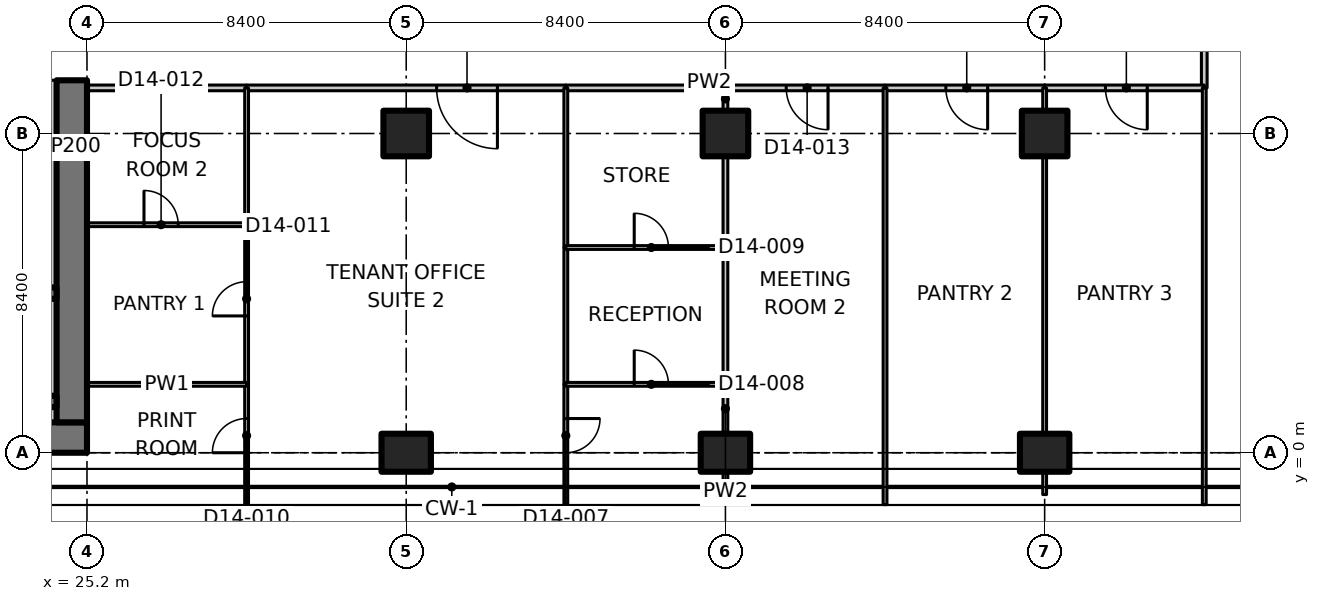
"""IFC4 building model, lengths in metres.
Left out: names, types, materials, properties, quantities, classifications, styles, units other than length and angle.
Written with IfcOpenShell. Run it as: python <this file> out.ifc"""

import sys

from ifc_helpers import new_model, si_unit, direction, frame, frame_2d, origin, origin_2d, place, context, subcontext, project, spatial, polyline, rectangle, outline, extrude, element, fill, save


model = new_model("IFC4")
c1 = context("Model", 3, precision=1e-05, world=origin(), true_north=direction((0.0, 1.0)))
c2 = subcontext(c1, "Body", "Model", "MODEL_VIEW")
j1 = project(units=[si_unit("LENGTHUNIT", "METRE"), si_unit("PLANEANGLEUNIT", "RADIAN")], contexts=[c1])
p1 = place(None, origin())
s1 = spatial("IfcSite", under=j1, at=p1, CompositionType="ELEMENT")
p2 = place(p1, origin())
s2 = spatial("IfcBuilding", under=s1, at=p2, CompositionType="ELEMENT")
p3 = place(p2, frame((0.0, 0.0, 102.5)))
s3 = spatial("IfcBuildingStorey", under=s2, at=p3, CompositionType="ELEMENT", Elevation=102.5)
p4 = place(p3, frame((33.6, 0.0, 0.0), z_axis=(0.0, 0.0, 1.0), x_axis=(0.0, 1.0, 0.0)))
e1 = element("IfcColumn", 1, at=p4, inside=s3, PredefinedType="COLUMN", context=c2, shape_type="SweptSolid", body=[
    extrude(rectangle(XDim=1.0, YDim=1.3, at=origin_2d()), origin(), (0.0, 0.0, 1.0), 3.35),
])
p5 = place(p3, frame((33.6, 8.4, 0.0), z_axis=(0.0, 0.0, 1.0), x_axis=(1.0, 0.0, 0.0)))
e2 = element("IfcColumn", 2, at=p5, inside=s3, PredefinedType="COLUMN", context=c2, shape_type="SweptSolid", body=[
    extrude(rectangle(XDim=1.2, YDim=1.2, at=origin_2d()), origin(), (0.0, 0.0, 1.0), 3.35),
])
p6 = place(p3, frame((42.0, 0.0, 0.0), z_axis=(0.0, 0.0, 1.0), x_axis=(0.0, 1.0, 0.0)))
e3 = element("IfcColumn", 3, at=p6, inside=s3, PredefinedType="COLUMN", context=c2, shape_type="SweptSolid", body=[
    extrude(rectangle(XDim=1.0, YDim=1.3, at=origin_2d()), origin(), (0.0, 0.0, 1.0), 3.35),
])
p7 = place(p3, frame((42.0, 8.4, 0.0), z_axis=(0.0, 0.0, 1.0), x_axis=(1.0, 0.0, 0.0)))
e4 = element("IfcColumn", 4, at=p7, inside=s3, PredefinedType="COLUMN", context=c2, shape_type="SweptSolid", body=[
    extrude(rectangle(XDim=1.2, YDim=1.2, at=origin_2d()), origin(), (0.0, 0.0, 1.0), 3.35),
])
p8 = place(p3, frame((50.4, 0.0, 0.0), z_axis=(0.0, 0.0, 1.0), x_axis=(0.0, 1.0, 0.0)))
e5 = element("IfcColumn", 5, at=p8, inside=s3, PredefinedType="COLUMN", context=c2, shape_type="SweptSolid", body=[
    extrude(rectangle(XDim=1.0, YDim=1.3, at=origin_2d()), origin(), (0.0, 0.0, 1.0), 3.35),
])
p9 = place(p3, frame((50.4, 8.4, 0.0), z_axis=(0.0, 0.0, 1.0), x_axis=(1.0, 0.0, 0.0)))
e6 = element("IfcColumn", 6, at=p9, inside=s3, PredefinedType="COLUMN", context=c2, shape_type="SweptSolid", body=[
    extrude(rectangle(XDim=1.2, YDim=1.2, at=origin_2d()), origin(), (0.0, 0.0, 1.0), 3.35),
])
p10 = place(p3, frame((7.136, 0.4, 0.0), z_axis=(0.0, 0.0, 1.0), x_axis=(1.0, 0.0, 0.0)))
e7 = element("IfcWall", 7, at=p10, inside=s3, PredefinedType="SHEAR", context=c2, shape_type="SweptSolid", body=[
    extrude(rectangle(XDim=18.063, YDim=0.8, at=frame_2d((9.032, 0.0))), origin(), (0.0, 0.0, 1.0), 3.35),
])
p11 = place(p3, frame((24.8, 0.8, 0.0), z_axis=(0.0, 0.0, 1.0), x_axis=(0.0, 1.0, 0.0)))
e8 = element("IfcWall", 8, at=p11, inside=s3, PredefinedType="SHEAR", context=c2, shape_type="SweptSolid", body=[
    extrude(rectangle(XDim=9.0, YDim=0.8, at=frame_2d((4.5, 0.0))), origin(), (0.0, 0.0, 1.0), 3.35),
])
p12 = place(p3, frame((15.8, 1.35, 0.0), z_axis=(0.0, 0.0, 1.0), x_axis=(1.0, 0.0, 0.0)))
e9 = element("IfcWall", 9, at=p12, inside=s3, PredefinedType="SHEAR", context=c2, shape_type="SweptSolid", body=[
    extrude(rectangle(XDim=8.6, YDim=0.3, at=frame_2d((4.3, 0.0))), origin(), (0.0, 0.0, 1.0), 3.35),
])
p13 = place(p3, frame((15.8, 4.2, 0.0), z_axis=(0.0, 0.0, 1.0), x_axis=(1.0, 0.0, 0.0)))
e10 = element("IfcWall", 10, at=p13, inside=s3, PredefinedType="SHEAR", context=c2, shape_type="SweptSolid", body=[
    extrude(rectangle(XDim=8.6, YDim=0.3, at=frame_2d((4.3, 0.0))), origin(), (0.0, 0.0, 1.0), 3.35),
])
p14 = place(p13, frame((0.4, 0.0, 0.0)))
e11 = element("IfcOpeningElement", 11, at=p14, cuts=e10, PredefinedType="OPENING", context=c2, shape_type="SweptSolid", body=[
    extrude(rectangle(XDim=1.0, YDim=2.1, at=frame_2d((0.5, 1.05))), frame((0.0, 0.16, 0.0), z_axis=(0.0, -1.0, 0.0), x_axis=(1.0, 0.0, 0.0)), (0.0, 0.0, 1.0), 0.32),
])
p15 = place(p3, frame((13.35, 1.0, 0.0), z_axis=(0.0, 0.0, 1.0), x_axis=(1.0, 0.0, 0.0)))
e12 = element("IfcWall", 12, at=p15, inside=s3, PredefinedType="PARTITIONING", context=c2, shape_type="SweptSolid", body=[
    extrude(rectangle(XDim=11.05, YDim=0.4, at=frame_2d((5.525, 0.0))), origin(), (0.0, 0.0, 1.0), 3.35),
])
p16 = place(p3, frame((24.2, 1.5, 0.0), z_axis=(0.0, 0.0, 1.0), x_axis=(0.0, 1.0, 0.0)))
e13 = element("IfcWall", 13, at=p16, inside=s3, PredefinedType="PARTITIONING", context=c2, shape_type="SweptSolid", body=[
    extrude(rectangle(XDim=2.55, YDim=0.4, at=frame_2d((1.275, 0.0))), origin(), (0.0, 0.0, 1.0), 3.35),
])
p17 = place(p3, frame((24.2, 4.35, 0.0), z_axis=(0.0, 0.0, 1.0), x_axis=(0.0, 1.0, 0.0)))
e14 = element("IfcWall", 14, at=p17, inside=s3, PredefinedType="PARTITIONING", context=c2, shape_type="SweptSolid", body=[
    extrude(rectangle(XDim=5.45, YDim=0.4, at=frame_2d((2.725, 0.0))), origin(), (0.0, 0.0, 1.0), 3.35),
])
p18 = place(p3, frame((29.4, 9.6, 0.0), z_axis=(0.0, 0.0, 1.0), x_axis=(-1.0, 0.0, 0.0)))
e15 = element("IfcWall", 15, at=p18, inside=s3, PredefinedType="PARTITIONING", context=c2, shape_type="SweptSolid", body=[
    extrude(rectangle(XDim=4.2, YDim=0.15, at=frame_2d((2.1, 0.0))), origin(), (0.0, 0.0, 1.0), 3.33),
])
p19 = place(p3, frame((54.6, 13.0, 0.0), z_axis=(0.0, 0.0, 1.0), x_axis=(0.0, -1.0, 0.0)))
e16 = element("IfcWall", 16, at=p19, inside=s3, PredefinedType="PARTITIONING", context=c2, shape_type="SweptSolid", body=[
    extrude(rectangle(XDim=3.4, YDim=0.15, at=frame_2d((1.7, 0.0))), origin(), (0.0, 0.0, 1.0), 3.33),
])
p20 = place(p3, frame((37.8, 9.6, 0.0), z_axis=(0.0, 0.0, 1.0), x_axis=(-1.0, 0.0, 0.0)))
e17 = element("IfcWall", 17, at=p20, inside=s3, PredefinedType="PARTITIONING", context=c2, shape_type="SweptSolid", body=[
    extrude(rectangle(XDim=8.4, YDim=0.15, at=frame_2d((4.2, 0.0))), origin(), (0.0, 0.0, 1.0), 3.33),
])
p21 = place(p20, frame((1.8, 0.0, 0.0)))
e18 = element("IfcOpeningElement", 18, at=p21, cuts=e17, PredefinedType="OPENING", context=c2, shape_type="SweptSolid", body=[
    extrude(rectangle(XDim=1.6, YDim=2.1, at=frame_2d((0.8, 1.05))), frame((0.0, 0.085, 0.0), z_axis=(0.0, -1.0, 0.0), x_axis=(1.0, 0.0, 0.0)), (0.0, 0.0, 1.0), 0.17),
])
p22 = place(p3, frame((42.0, 9.6, 0.0), z_axis=(0.0, 0.0, 1.0), x_axis=(-1.0, 0.0, 0.0)))
e19 = element("IfcWall", 19, at=p22, inside=s3, PredefinedType="PARTITIONING", context=c2, shape_type="SweptSolid", body=[
    extrude(rectangle(XDim=4.2, YDim=0.15, at=frame_2d((2.1, 0.0))), origin(), (0.0, 0.0, 1.0), 3.33),
])
p23 = place(p3, frame((46.2, 9.6, 0.0), z_axis=(0.0, 0.0, 1.0), x_axis=(-1.0, 0.0, 0.0)))
e20 = element("IfcWall", 20, at=p23, inside=s3, PredefinedType="PARTITIONING", context=c2, shape_type="SweptSolid", body=[
    extrude(rectangle(XDim=4.2, YDim=0.15, at=frame_2d((2.1, 0.0))), origin(), (0.0, 0.0, 1.0), 3.33),
])
p24 = place(p23, frame((1.5, 0.0, 0.0)))
e21 = element("IfcOpeningElement", 21, at=p24, cuts=e20, PredefinedType="OPENING", context=c2, shape_type="SweptSolid", body=[
    extrude(rectangle(XDim=1.1, YDim=2.1, at=frame_2d((0.55, 1.05))), frame((0.0, 0.085, 0.0), z_axis=(0.0, -1.0, 0.0), x_axis=(1.0, 0.0, 0.0)), (0.0, 0.0, 1.0), 0.17),
])
p25 = place(p3, frame((50.4, 9.6, 0.0), z_axis=(0.0, 0.0, 1.0), x_axis=(-1.0, 0.0, 0.0)))
e22 = element("IfcWall", 22, at=p25, inside=s3, PredefinedType="PARTITIONING", context=c2, shape_type="SweptSolid", body=[
    extrude(rectangle(XDim=4.2, YDim=0.15, at=frame_2d((2.1, 0.0))), origin(), (0.0, 0.0, 1.0), 3.33),
])
p26 = place(p25, frame((1.5, 0.0, 0.0)))
e23 = element("IfcOpeningElement", 23, at=p26, cuts=e22, PredefinedType="OPENING", context=c2, shape_type="SweptSolid", body=[
    extrude(rectangle(XDim=1.1, YDim=2.1, at=frame_2d((0.55, 1.05))), frame((0.0, 0.085, 0.0), z_axis=(0.0, -1.0, 0.0), x_axis=(1.0, 0.0, 0.0)), (0.0, 0.0, 1.0), 0.17),
])
p27 = place(p3, frame((54.6, 9.6, 0.0), z_axis=(0.0, 0.0, 1.0), x_axis=(-1.0, 0.0, 0.0)))
e24 = element("IfcWall", 24, at=p27, inside=s3, PredefinedType="PARTITIONING", context=c2, shape_type="SweptSolid", body=[
    extrude(rectangle(XDim=4.2, YDim=0.15, at=frame_2d((2.1, 0.0))), origin(), (0.0, 0.0, 1.0), 3.33),
])
p28 = place(p27, frame((1.5, 0.0, 0.0)))
e25 = element("IfcOpeningElement", 25, at=p28, cuts=e24, PredefinedType="OPENING", context=c2, shape_type="SweptSolid", body=[
    extrude(rectangle(XDim=1.1, YDim=2.1, at=frame_2d((0.55, 1.05))), frame((0.0, 0.085, 0.0), z_axis=(0.0, -1.0, 0.0), x_axis=(1.0, 0.0, 0.0)), (0.0, 0.0, 1.0), 0.17),
])
p29 = place(p3, frame((54.6, -1.365, 0.0), z_axis=(0.0, 0.0, 1.0), x_axis=(0.0, 1.0, 0.0)))
e26 = element("IfcWall", 26, at=p29, inside=s3, PredefinedType="PARTITIONING", context=c2, shape_type="SweptSolid", body=[
    extrude(outline(polyline([(0.0, 0.0), (10.965, 0.0), (10.965, 3.33), (1.815, 3.33), (1.813, 2.98), (0.917, 2.98), (0.915, 3.33), (0.265, 3.33), (0.0, 3.33), (0.0, 0.0)])), frame((0.0, 0.05, 0.0), z_axis=(0.0, -1.0, 0.0), x_axis=(1.0, 0.0, 0.0)), (0.0, 0.0, 1.0), 0.1),
])
p30 = place(p3, frame((37.8, 1.8, 0.0), z_axis=(0.0, 0.0, 1.0), x_axis=(0.0, -1.0, 0.0)))
e27 = element("IfcWall", 27, at=p30, inside=s3, PredefinedType="PARTITIONING", context=c2, shape_type="SweptSolid", body=[
    extrude(rectangle(XDim=3.165, YDim=0.1, at=frame_2d((1.583, 0.0))), origin(), (0.0, 0.0, 1.0), 2.98),
])
p31 = place(p30, frame((0.9, 0.0, 0.0)))
e28 = element("IfcOpeningElement", 28, at=p31, cuts=e27, PredefinedType="OPENING", context=c2, shape_type="SweptSolid", body=[
    extrude(rectangle(XDim=0.9, YDim=2.1, at=frame_2d((0.45, 1.05))), frame((0.0, 0.06, 0.0), z_axis=(0.0, -1.0, 0.0), x_axis=(1.0, 0.0, 0.0)), (0.0, 0.0, 1.0), 0.12),
])
p32 = place(p3, frame((37.8, 5.4, 0.0), z_axis=(0.0, 0.0, 1.0), x_axis=(0.0, -1.0, 0.0)))
e29 = element("IfcWall", 29, at=p32, inside=s3, PredefinedType="PARTITIONING", context=c2, shape_type="SweptSolid", body=[
    extrude(rectangle(XDim=3.6, YDim=0.1, at=frame_2d((1.8, 0.0))), origin(), (0.0, 0.0, 1.0), 3.33),
])
p33 = place(p3, frame((37.8, 9.6, 0.0), z_axis=(0.0, 0.0, 1.0), x_axis=(0.0, -1.0, 0.0)))
e30 = element("IfcWall", 30, at=p33, inside=s3, PredefinedType="PARTITIONING", context=c2, shape_type="SweptSolid", body=[
    extrude(rectangle(XDim=4.2, YDim=0.1, at=frame_2d((2.1, 0.0))), origin(), (0.0, 0.0, 1.0), 3.33),
])
p34 = place(p3, frame((29.4, -1.365, 0.0), z_axis=(0.0, 0.0, 1.0), x_axis=(0.0, 1.0, 0.0)))
e31 = element("IfcWall", 31, at=p34, inside=s3, PredefinedType="PARTITIONING", context=c2, shape_type="SweptSolid", body=[
    extrude(rectangle(XDim=3.165, YDim=0.1, at=frame_2d((1.583, 0.0))), origin(), (0.0, 0.0, 1.0), 2.98),
])
p35 = place(p34, frame((1.365, 0.0, 0.0)))
e32 = element("IfcOpeningElement", 32, at=p35, cuts=e31, PredefinedType="OPENING", context=c2, shape_type="SweptSolid", body=[
    extrude(rectangle(XDim=0.9, YDim=2.1, at=frame_2d((0.45, 1.05))), frame((0.0, 0.06, 0.0), z_axis=(0.0, -1.0, 0.0), x_axis=(1.0, 0.0, 0.0)), (0.0, 0.0, 1.0), 0.12),
])
p36 = place(p3, frame((29.4, 1.8, 0.0), z_axis=(0.0, 0.0, 1.0), x_axis=(0.0, 1.0, 0.0)))
e33 = element("IfcWall", 33, at=p36, inside=s3, PredefinedType="PARTITIONING", context=c2, shape_type="SweptSolid", body=[
    extrude(rectangle(XDim=4.2, YDim=0.1, at=frame_2d((2.1, 0.0))), origin(), (0.0, 0.0, 1.0), 3.33),
])
p37 = place(p36, frame((1.8, 0.0, 0.0)))
e34 = element("IfcOpeningElement", 34, at=p37, cuts=e33, PredefinedType="OPENING", context=c2, shape_type="SweptSolid", body=[
    extrude(rectangle(XDim=0.9, YDim=2.1, at=frame_2d((0.45, 1.05))), frame((0.0, 0.06, 0.0), z_axis=(0.0, -1.0, 0.0), x_axis=(1.0, 0.0, 0.0)), (0.0, 0.0, 1.0), 0.12),
])
p38 = place(p3, frame((29.4, 6.0, 0.0), z_axis=(0.0, 0.0, 1.0), x_axis=(0.0, 1.0, 0.0)))
e35 = element("IfcWall", 35, at=p38, inside=s3, PredefinedType="PARTITIONING", context=c2, shape_type="SweptSolid", body=[
    extrude(rectangle(XDim=3.6, YDim=0.1, at=frame_2d((1.8, 0.0))), origin(), (0.0, 0.0, 1.0), 3.33),
])
p39 = place(p3, frame((37.8, 1.8, 0.0), z_axis=(0.0, 0.0, 1.0), x_axis=(1.0, 0.0, 0.0)))
e36 = element("IfcWall", 36, at=p39, inside=s3, PredefinedType="PARTITIONING", context=c2, shape_type="SweptSolid", body=[
    extrude(rectangle(XDim=4.2, YDim=0.1, at=frame_2d((2.1, 0.0))), origin(), (0.0, 0.0, 1.0), 3.33),
])
p40 = place(p39, frame((1.8, 0.0, 0.0)))
e37 = element("IfcOpeningElement", 37, at=p40, cuts=e36, PredefinedType="OPENING", context=c2, shape_type="SweptSolid", body=[
    extrude(rectangle(XDim=0.9, YDim=2.1, at=frame_2d((0.45, 1.05))), frame((0.0, 0.06, 0.0), z_axis=(0.0, -1.0, 0.0), x_axis=(1.0, 0.0, 0.0)), (0.0, 0.0, 1.0), 0.12),
])
p41 = place(p3, frame((42.0, 1.8, 0.0), z_axis=(0.0, 0.0, 1.0), x_axis=(0.0, -1.0, 0.0)))
e38 = element("IfcWall", 38, at=p41, inside=s3, PredefinedType="PARTITIONING", context=c2, shape_type="SweptSolid", body=[
    extrude(rectangle(XDim=1.28, YDim=0.125, at=frame_2d((0.64, 0.0))), origin(), (0.0, 0.0, 1.0), 3.33),
])
p42 = place(p3, frame((42.0, -0.52, 0.0), z_axis=(0.0, 0.0, 1.0), x_axis=(0.0, -1.0, 0.0)))
e39 = element("IfcWall", 39, at=p42, inside=s3, PredefinedType="PARTITIONING", context=c2, shape_type="SweptSolid", body=[
    extrude(rectangle(XDim=0.58, YDim=0.125, at=frame_2d((0.29, 0.0))), origin(), (0.0, 0.0, 1.0), 3.33),
])
p43 = place(p3, frame((37.8, 5.4, 0.0), z_axis=(0.0, 0.0, 1.0), x_axis=(1.0, 0.0, 0.0)))
e40 = element("IfcWall", 40, at=p43, inside=s3, PredefinedType="PARTITIONING", context=c2, shape_type="SweptSolid", body=[
    extrude(rectangle(XDim=4.2, YDim=0.1, at=frame_2d((2.1, 0.0))), origin(), (0.0, 0.0, 1.0), 3.33),
])
p44 = place(p43, frame((1.8, 0.0, 0.0)))
e41 = element("IfcOpeningElement", 41, at=p44, cuts=e40, PredefinedType="OPENING", context=c2, shape_type="SweptSolid", body=[
    extrude(rectangle(XDim=0.9, YDim=2.1, at=frame_2d((0.45, 1.05))), frame((0.0, 0.06, 0.0), z_axis=(0.0, -1.0, 0.0), x_axis=(1.0, 0.0, 0.0)), (0.0, 0.0, 1.0), 0.12),
])
p45 = place(p3, frame((42.0, 5.4, 0.0), z_axis=(0.0, 0.0, 1.0), x_axis=(0.0, -1.0, 0.0)))
e42 = element("IfcWall", 42, at=p45, inside=s3, PredefinedType="PARTITIONING", context=c2, shape_type="SweptSolid", body=[
    extrude(rectangle(XDim=3.6, YDim=0.125, at=frame_2d((1.8, 0.0))), origin(), (0.0, 0.0, 1.0), 3.33),
])
p46 = place(p3, frame((42.0, 9.6, 0.0), z_axis=(0.0, 0.0, 1.0), x_axis=(0.0, -1.0, 0.0)))
e43 = element("IfcWall", 43, at=p46, inside=s3, PredefinedType="PARTITIONING", context=c2, shape_type="SweptSolid", body=[
    extrude(rectangle(XDim=0.58, YDim=0.125, at=frame_2d((0.29, 0.0))), origin(), (0.0, 0.0, 1.0), 3.33),
])
p47 = place(p3, frame((42.0, 7.78, 0.0), z_axis=(0.0, 0.0, 1.0), x_axis=(0.0, -1.0, 0.0)))
e44 = element("IfcWall", 44, at=p47, inside=s3, PredefinedType="PARTITIONING", context=c2, shape_type="SweptSolid", body=[
    extrude(rectangle(XDim=2.38, YDim=0.125, at=frame_2d((1.19, 0.0))), origin(), (0.0, 0.0, 1.0), 3.33),
])
p48 = place(p3, frame((25.2, 1.8, 0.0), z_axis=(0.0, 0.0, 1.0), x_axis=(1.0, 0.0, 0.0)))
e45 = element("IfcWall", 45, at=p48, inside=s3, PredefinedType="PARTITIONING", context=c2, shape_type="SweptSolid", body=[
    extrude(rectangle(XDim=4.2, YDim=0.1, at=frame_2d((2.1, 0.0))), origin(), (0.0, 0.0, 1.0), 3.33),
])
p49 = place(p3, frame((25.2, 6.0, 0.0), z_axis=(0.0, 0.0, 1.0), x_axis=(1.0, 0.0, 0.0)))
e46 = element("IfcWall", 46, at=p49, inside=s3, PredefinedType="PARTITIONING", context=c2, shape_type="SweptSolid", body=[
    extrude(rectangle(XDim=4.2, YDim=0.1, at=frame_2d((2.1, 0.0))), origin(), (0.0, 0.0, 1.0), 3.33),
])
p50 = place(p49, frame((1.5, 0.0, 0.0)))
e47 = element("IfcOpeningElement", 47, at=p50, cuts=e46, PredefinedType="OPENING", context=c2, shape_type="SweptSolid", body=[
    extrude(rectangle(XDim=0.9, YDim=2.1, at=frame_2d((0.45, 1.05))), frame((0.0, 0.06, 0.0), z_axis=(0.0, -1.0, 0.0), x_axis=(1.0, 0.0, 0.0)), (0.0, 0.0, 1.0), 0.12),
])
p51 = place(p3, frame((46.2, 9.6, 0.0), z_axis=(0.0, 0.0, 1.0), x_axis=(0.0, -1.0, 0.0)))
e48 = element("IfcWall", 48, at=p51, inside=s3, PredefinedType="PARTITIONING", context=c2, shape_type="SweptSolid", body=[
    extrude(outline(polyline([(0.0, 0.0), (10.965, 0.0), (10.965, 3.33), (10.7, 3.33), (10.05, 3.33), (10.048, 2.98), (9.152, 2.98), (9.15, 3.33), (0.0, 3.33), (0.0, 0.0)])), frame((0.0, 0.05, 0.0), z_axis=(0.0, -1.0, 0.0), x_axis=(1.0, 0.0, 0.0)), (0.0, 0.0, 1.0), 0.1),
])
p52 = place(p3, frame((50.4, 9.6, 0.0), z_axis=(0.0, 0.0, 1.0), x_axis=(0.0, -1.0, 0.0)))
e49 = element("IfcWall", 49, at=p52, inside=s3, PredefinedType="PARTITIONING", context=c2, shape_type="SweptSolid", body=[
    extrude(rectangle(XDim=0.58, YDim=0.1, at=frame_2d((0.29, 0.0))), origin(), (0.0, 0.0, 1.0), 3.33),
])
p53 = place(p3, frame((50.4, 7.78, 0.0), z_axis=(0.0, 0.0, 1.0), x_axis=(0.0, -1.0, 0.0)))
e50 = element("IfcWall", 50, at=p53, inside=s3, PredefinedType="PARTITIONING", context=c2, shape_type="SweptSolid", body=[
    extrude(rectangle(XDim=7.26, YDim=0.1, at=frame_2d((3.63, 0.0))), origin(), (0.0, 0.0, 1.0), 3.33),
])
p54 = place(p3, frame((50.4, -0.52, 0.0), z_axis=(0.0, 0.0, 1.0), x_axis=(0.0, -1.0, 0.0)))
e51 = element("IfcWall", 51, at=p54, inside=s3, PredefinedType="PARTITIONING", context=c2, shape_type="SweptSolid", body=[
    extrude(rectangle(XDim=0.58, YDim=0.1, at=frame_2d((0.29, 0.0))), origin(), (0.0, 0.0, 1.0), 3.33),
])
p55 = place(p21, origin())
e52 = element("IfcDoor", 52, at=p55, inside=s3, OperationType="DOUBLE_DOOR_SINGLE_SWING", PredefinedType="DOOR", context=c2, shape_type="SweptSolid", body=[
    extrude(rectangle(XDim=1.6, YDim=2.1, at=frame_2d((0.8, 1.05))), frame((0.0, 0.025, 0.0), z_axis=(0.0, -1.0, 0.0), x_axis=(1.0, 0.0, 0.0)), (0.0, 0.0, 1.0), 0.05),
])
fill(e18, e52)
p56 = place(p31, origin())
e53 = element("IfcDoor", 53, at=p56, inside=s3, OperationType="SINGLE_SWING_LEFT", PredefinedType="DOOR", context=c2, shape_type="SweptSolid", body=[
    extrude(rectangle(XDim=0.9, YDim=2.1, at=frame_2d((0.45, 1.05))), frame((0.0, 0.025, 0.0), z_axis=(0.0, -1.0, 0.0), x_axis=(1.0, 0.0, 0.0)), (0.0, 0.0, 1.0), 0.05),
])
fill(e28, e53)
p57 = place(p40, origin())
e54 = element("IfcDoor", 54, at=p57, inside=s3, OperationType="SINGLE_SWING_LEFT", PredefinedType="DOOR", context=c2, shape_type="SweptSolid", body=[
    extrude(rectangle(XDim=0.9, YDim=2.1, at=frame_2d((0.45, 1.05))), frame((0.0, 0.025, 0.0), z_axis=(0.0, -1.0, 0.0), x_axis=(1.0, 0.0, 0.0)), (0.0, 0.0, 1.0), 0.05),
])
fill(e37, e54)
p58 = place(p44, origin())
e55 = element("IfcDoor", 55, at=p58, inside=s3, OperationType="SINGLE_SWING_LEFT", PredefinedType="DOOR", context=c2, shape_type="SweptSolid", body=[
    extrude(rectangle(XDim=0.9, YDim=2.1, at=frame_2d((0.45, 1.05))), frame((0.0, 0.025, 0.0), z_axis=(0.0, -1.0, 0.0), x_axis=(1.0, 0.0, 0.0)), (0.0, 0.0, 1.0), 0.05),
])
fill(e41, e55)
p59 = place(p35, origin())
e56 = element("IfcDoor", 56, at=p59, inside=s3, OperationType="SINGLE_SWING_LEFT", PredefinedType="DOOR", context=c2, shape_type="SweptSolid", body=[
    extrude(rectangle(XDim=0.9, YDim=2.1, at=frame_2d((0.45, 1.05))), frame((0.0, 0.025, 0.0), z_axis=(0.0, -1.0, 0.0), x_axis=(1.0, 0.0, 0.0)), (0.0, 0.0, 1.0), 0.05),
])
fill(e32, e56)
p60 = place(p37, origin())
e57 = element("IfcDoor", 57, at=p60, inside=s3, OperationType="SINGLE_SWING_LEFT", PredefinedType="DOOR", context=c2, shape_type="SweptSolid", body=[
    extrude(rectangle(XDim=0.9, YDim=2.1, at=frame_2d((0.45, 1.05))), frame((0.0, 0.025, 0.0), z_axis=(0.0, -1.0, 0.0), x_axis=(1.0, 0.0, 0.0)), (0.0, 0.0, 1.0), 0.05),
])
fill(e34, e57)
p61 = place(p50, origin())
e58 = element("IfcDoor", 58, at=p61, inside=s3, OperationType="SINGLE_SWING_LEFT", PredefinedType="DOOR", context=c2, shape_type="SweptSolid", body=[
    extrude(rectangle(XDim=0.9, YDim=2.1, at=frame_2d((0.45, 1.05))), frame((0.0, 0.025, 0.0), z_axis=(0.0, -1.0, 0.0), x_axis=(1.0, 0.0, 0.0)), (0.0, 0.0, 1.0), 0.05),
])
fill(e47, e58)
p62 = place(p24, origin())
e59 = element("IfcDoor", 59, at=p62, inside=s3, OperationType="SINGLE_SWING_LEFT", PredefinedType="DOOR", context=c2, shape_type="SweptSolid", body=[
    extrude(rectangle(XDim=1.1, YDim=2.1, at=frame_2d((0.55, 1.05))), frame((0.0, 0.025, 0.0), z_axis=(0.0, -1.0, 0.0), x_axis=(1.0, 0.0, 0.0)), (0.0, 0.0, 1.0), 0.05),
])
fill(e21, e59)
p63 = place(p26, origin())
e60 = element("IfcDoor", 60, at=p63, inside=s3, OperationType="SINGLE_SWING_LEFT", PredefinedType="DOOR", context=c2, shape_type="SweptSolid", body=[
    extrude(rectangle(XDim=1.1, YDim=2.1, at=frame_2d((0.55, 1.05))), frame((0.0, 0.025, 0.0), z_axis=(0.0, -1.0, 0.0), x_axis=(1.0, 0.0, 0.0)), (0.0, 0.0, 1.0), 0.05),
])
fill(e23, e60)
p64 = place(p28, origin())
e61 = element("IfcDoor", 61, at=p64, inside=s3, OperationType="SINGLE_SWING_LEFT", PredefinedType="DOOR", context=c2, shape_type="SweptSolid", body=[
    extrude(rectangle(XDim=1.1, YDim=2.1, at=frame_2d((0.55, 1.05))), frame((0.0, 0.025, 0.0), z_axis=(0.0, -1.0, 0.0), x_axis=(1.0, 0.0, 0.0)), (0.0, 0.0, 1.0), 0.05),
])
fill(e25, e61)
save(model, sys.argv[1])
